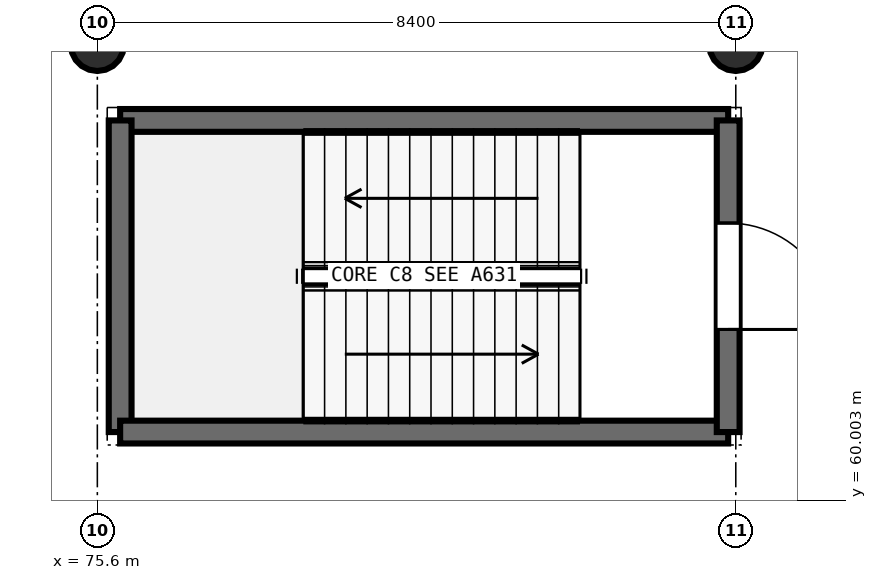
"""IFC4 building model, lengths in metres.
Left out: names, types, materials, properties, quantities, classifications, styles, units other than length and angle.
Written with IfcOpenShell. Run it as: python <this file> out.ifc"""

import sys

from ifc_helpers import new_model, si_unit, direction, frame, frame_2d, origin, origin_2d, place, context, subcontext, project, spatial, rectangle, circle, extrude, element, fill, save


model = new_model("IFC4")
c1 = context("Model", 3, precision=1e-05, world=origin(), true_north=direction((0.0, 1.0)))
c2 = subcontext(c1, "Body", "Model", "MODEL_VIEW")
j1 = project(units=[si_unit("LENGTHUNIT", "METRE"), si_unit("PLANEANGLEUNIT", "RADIAN")], contexts=[c1])
p1 = place(None, origin())
s1 = spatial("IfcSite", under=j1, at=p1, CompositionType="ELEMENT")
p2 = place(p1, origin())
s2 = spatial("IfcBuilding", under=s1, at=p2, CompositionType="ELEMENT")
p3 = place(p2, frame((0.0, 0.0, -4.8)))
s3 = spatial("IfcBuildingStorey", under=s2, at=p3, CompositionType="ELEMENT", Elevation=-4.8)
for number, where, z_axis, x_axis in (
    (1, (75.6, 66.0, 0.0), (0.0, 0.0, 1.0), (1.0, 0.0, 0.0)),
    (2, (84.0, 66.0, 0.0), (0.0, 0.0, 1.0), (1.0, 0.0, 0.0)),
):
    element("IfcColumn", number, at=place(p3, frame(where, z_axis=z_axis, x_axis=x_axis)), inside=s3, PredefinedType="COLUMN", context=c2, shape_type="SweptSolid", body=[
        extrude(circle(Radius=0.35, at=origin_2d()), origin(), (0.0, 0.0, 1.0), 4.8),
    ])
p4 = place(p3, frame((83.9, 65.0, 0.0), z_axis=(0.0, 0.0, 1.0), x_axis=(-1.0, 0.0, 0.0)))
e3 = element("IfcWall", 3, at=p4, inside=s3, PredefinedType="SHEAR", context=c2, shape_type="SweptSolid", body=[
    extrude(rectangle(XDim=8.0, YDim=0.3, at=frame_2d((4.0, 0.0))), origin(), (0.0, 0.0, 1.0), 4.8),
])
p5 = place(p3, frame((75.9, 65.0, 0.0), z_axis=(0.0, 0.0, 1.0), x_axis=(0.0, -1.0, 0.0)))
e4 = element("IfcWall", 4, at=p5, inside=s3, PredefinedType="SHEAR", context=c2, shape_type="SweptSolid", body=[
    extrude(rectangle(XDim=4.1, YDim=0.3, at=frame_2d((2.05, 0.0))), origin(), (0.0, 0.0, 1.0), 4.8),
])
p6 = place(p3, frame((75.9, 60.9, 0.0), z_axis=(0.0, 0.0, 1.0), x_axis=(1.0, 0.0, 0.0)))
e5 = element("IfcWall", 5, at=p6, inside=s3, PredefinedType="SHEAR", context=c2, shape_type="SweptSolid", body=[
    extrude(rectangle(XDim=8.0, YDim=0.3, at=frame_2d((4.0, 0.0))), origin(), (0.0, 0.0, 1.0), 4.8),
])
p7 = place(p3, frame((83.9, 60.9, 0.0), z_axis=(0.0, 0.0, 1.0), x_axis=(0.0, 1.0, 0.0)))
e6 = element("IfcWall", 6, at=p7, inside=s3, PredefinedType="SHEAR", context=c2, shape_type="SweptSolid", body=[
    extrude(rectangle(XDim=4.1, YDim=0.3, at=frame_2d((2.05, 0.0))), origin(), (0.0, 0.0, 1.0), 4.8),
])
p8 = place(p7, frame((1.35, 0.0, 0.0)))
e7 = element("IfcOpeningElement", 7, at=p8, cuts=e6, PredefinedType="OPENING", context=c2, shape_type="SweptSolid", body=[
    extrude(rectangle(XDim=1.4, YDim=2.2, at=frame_2d((0.7, 1.1))), frame((0.0, 0.16, 0.0), z_axis=(0.0, -1.0, 0.0), x_axis=(1.0, 0.0, 0.0)), (0.0, 0.0, 1.0), 0.32),
])
p9 = place(p8, frame((1.4, 0.0, 0.0), z_axis=(0.0, 0.0, 1.0), x_axis=(-1.0, 0.0, 0.0)))
e8 = element("IfcDoor", 8, at=p9, inside=s3, OperationType="SINGLE_SWING_RIGHT", PredefinedType="DOOR", context=c2, shape_type="SweptSolid", body=[
    extrude(rectangle(XDim=1.4, YDim=2.2, at=frame_2d((0.7, 1.1))), frame((0.0, 0.025, 0.0), z_axis=(0.0, -1.0, 0.0), x_axis=(1.0, 0.0, 0.0)), (0.0, 0.0, 1.0), 0.05),
])
fill(e7, e8)
save(model, sys.argv[1])
